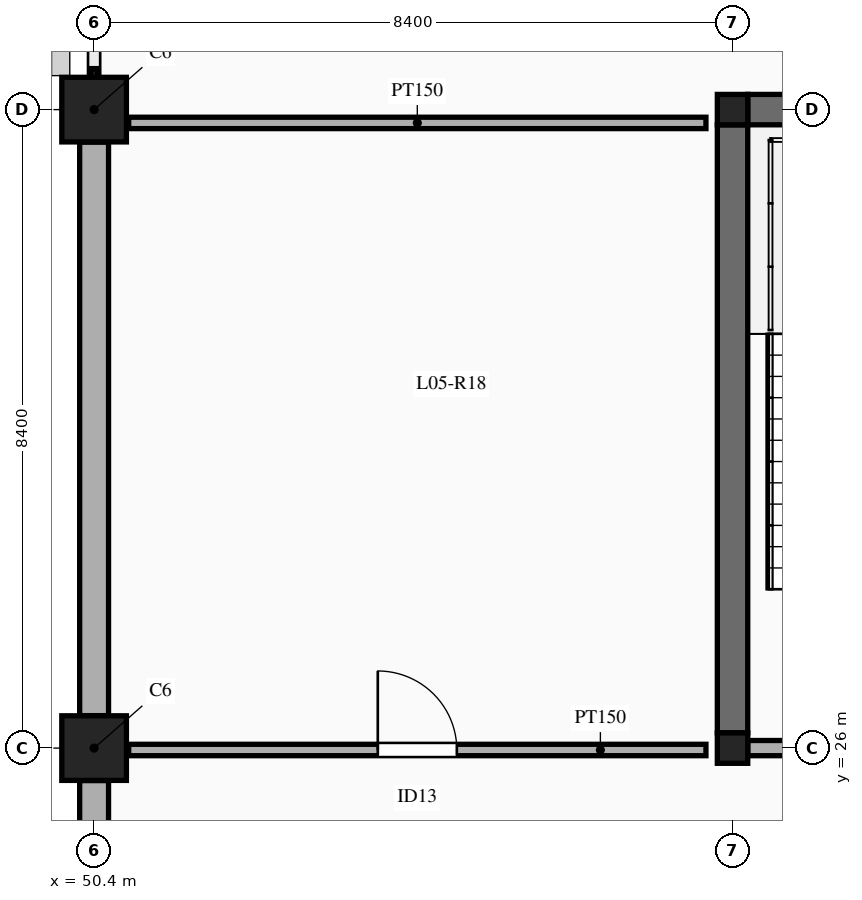
"""IFC4 building model, lengths in metres.
Left out: names, types, materials, properties, quantities, classifications, styles, units other than length and angle.
Written with IfcOpenShell. Run it as: python <this file> out.ifc"""

import sys

from ifc_helpers import new_model, si_unit, direction, frame, frame_2d, origin, origin_2d, place, context, subcontext, project, spatial, rectangle, extrude, element, fill, save


model = new_model("IFC4")
c1 = context("Model", 3, precision=1e-05, world=origin(), true_north=direction((0.0, 1.0)))
c2 = subcontext(c1, "Body", "Model", "MODEL_VIEW")
j1 = project(units=[si_unit("LENGTHUNIT", "METRE"), si_unit("PLANEANGLEUNIT", "RADIAN")], contexts=[c1])
p1 = place(None, origin())
s1 = spatial("IfcSite", under=j1, at=p1, CompositionType="ELEMENT")
p2 = place(p1, origin())
s2 = spatial("IfcBuilding", under=s1, at=p2, CompositionType="ELEMENT")
p3 = place(p2, frame((0.0, 0.0, 24.0)))
s3 = spatial("IfcBuildingStorey", under=s2, at=p3, CompositionType="ELEMENT", Elevation=24.0)
for number, where, z_axis, x_axis in (
    (1, (50.4, 26.0, 0.0), (0.0, 0.0, 1.0), (1.0, 0.0, 0.0)),
    (2, (50.4, 34.4, 0.0), (0.0, 0.0, 1.0), (1.0, 0.0, 0.0)),
):
    element("IfcColumn", number, at=place(p3, frame(where, z_axis=z_axis, x_axis=x_axis)), inside=s3, PredefinedType="COLUMN", context=c2, shape_type="SweptSolid", body=[
        extrude(rectangle(XDim=0.85, YDim=0.85, at=origin_2d()), origin(), (0.0, 0.0, 1.0), 4.5),
    ])
for number, where, z_axis, x_axis in (
    (3, (58.8, 26.0, 0.0), (0.0, 0.0, 1.0), (1.0, 0.0, 0.0)),
    (4, (58.8, 34.4, 0.0), (0.0, 0.0, 1.0), (1.0, 0.0, 0.0)),
):
    element("IfcColumn", number, at=place(p3, frame(where, z_axis=z_axis, x_axis=x_axis)), inside=s3, PredefinedType="COLUMN", context=c2, shape_type="SweptSolid", body=[
        extrude(rectangle(XDim=0.4, YDim=0.4, at=origin_2d()), origin(), (0.0, 0.0, 1.0), 4.5),
    ])
for number, where, z_axis, x_axis in (
    (5, (58.8, 26.2, 0.0), (0.0, 0.0, 1.0), (0.0, 1.0, 0.0)),
    (6, (59.0, 34.4, 0.0), (0.0, 0.0, 1.0), (1.0, 0.0, 0.0)),
):
    element("IfcWall", number, at=place(p3, frame(where, z_axis=z_axis, x_axis=x_axis)), inside=s3, PredefinedType="SHEAR", context=c2, shape_type="SweptSolid", body=[
        extrude(rectangle(XDim=8.0, YDim=0.4, at=frame_2d((4.0, 0.0))), origin(), (0.0, 0.0, 1.0), 4.5),
    ])
for number, where, z_axis, x_axis in (
    (7, (50.4, 18.027, 0.0), (0.0, 0.0, 1.0), (0.0, 1.0, 0.0)),
    (8, (50.4, 26.427, 0.0), (0.0, 0.0, 1.0), (0.0, 1.0, 0.0)),
):
    element("IfcWall", number, at=place(p3, frame(where, z_axis=z_axis, x_axis=x_axis)), inside=s3, PredefinedType="SOLIDWALL", context=c2, shape_type="SweptSolid", body=[
        extrude(rectangle(XDim=7.546, YDim=0.38, at=frame_2d((3.773, 0.0))), origin(), (0.0, 0.0, 1.0), 3.55),
    ])
p4 = place(p3, frame((59.0, 26.0, 0.0), z_axis=(0.0, 0.0, 1.0), x_axis=(1.0, 0.0, 0.0)))
e9 = element("IfcWall", 9, at=p4, inside=s3, PredefinedType="SOLIDWALL", context=c2, shape_type="SweptSolid", body=[
    extrude(rectangle(XDim=8.0, YDim=0.2, at=frame_2d((4.0, 0.0))), origin(), (0.0, 0.0, 1.0), 3.58),
])
p5 = place(p4, frame((1.55, 0.0, 0.0)))
e10 = element("IfcOpeningElement", 10, at=p5, cuts=e9, PredefinedType="OPENING", context=c2, shape_type="SweptSolid", body=[
    extrude(rectangle(XDim=1.15, YDim=2.15, at=frame_2d((0.575, 1.075))), frame((0.0, 0.11, 0.0), z_axis=(0.0, -1.0, 0.0), x_axis=(1.0, 0.0, 0.0)), (0.0, 0.0, 1.0), 0.22),
])
p6 = place(p4, frame((5.35, 0.0, 0.0)))
e11 = element("IfcOpeningElement", 11, at=p6, cuts=e9, PredefinedType="OPENING", context=c2, shape_type="SweptSolid", body=[
    extrude(rectangle(XDim=1.22, YDim=2.15, at=frame_2d((0.61, 1.075))), frame((0.0, 0.11, 0.0), z_axis=(0.0, -1.0, 0.0), x_axis=(1.0, 0.0, 0.0)), (0.0, 0.0, 1.0), 0.22),
])
p7 = place(p3, frame((50.855, 25.975, 0.0), z_axis=(0.0, 0.0, 1.0), x_axis=(1.0, 0.0, 0.0)))
e12 = element("IfcWall", 12, at=p7, inside=s3, PredefinedType="PARTITIONING", context=c2, shape_type="SweptSolid", body=[
    extrude(rectangle(XDim=7.595, YDim=0.15, at=frame_2d((3.797, 0.0))), origin(), (0.0, 0.0, 1.0), 3.45),
])
p8 = place(p7, frame((3.278, 0.0, 0.0)))
e13 = element("IfcOpeningElement", 13, at=p8, cuts=e12, PredefinedType="OPENING", context=c2, shape_type="SweptSolid", body=[
    extrude(rectangle(XDim=1.04, YDim=2.15, at=frame_2d((0.52, 1.075))), frame((0.0, 0.085, 0.0), z_axis=(0.0, -1.0, 0.0), x_axis=(1.0, 0.0, 0.0)), (0.0, 0.0, 1.0), 0.17),
])
p9 = place(p3, frame((50.855, 34.225, 0.0), z_axis=(0.0, 0.0, 1.0), x_axis=(1.0, 0.0, 0.0)))
e14 = element("IfcWall", 14, at=p9, inside=s3, PredefinedType="PARTITIONING", context=c2, shape_type="SweptSolid", body=[
    extrude(rectangle(XDim=7.595, YDim=0.15, at=frame_2d((3.797, 0.0))), origin(), (0.0, 0.0, 1.0), 3.45),
])
p10 = place(p8, origin())
e15 = element("IfcDoor", 15, at=p10, inside=s3, OperationType="SINGLE_SWING_LEFT", PredefinedType="DOOR", context=c2, shape_type="SweptSolid", body=[
    extrude(rectangle(XDim=1.04, YDim=2.15, at=frame_2d((0.52, 1.075))), frame((0.0, 0.025, 0.0), z_axis=(0.0, -1.0, 0.0), x_axis=(1.0, 0.0, 0.0)), (0.0, 0.0, 1.0), 0.05),
])
fill(e13, e15)
save(model, sys.argv[1])
